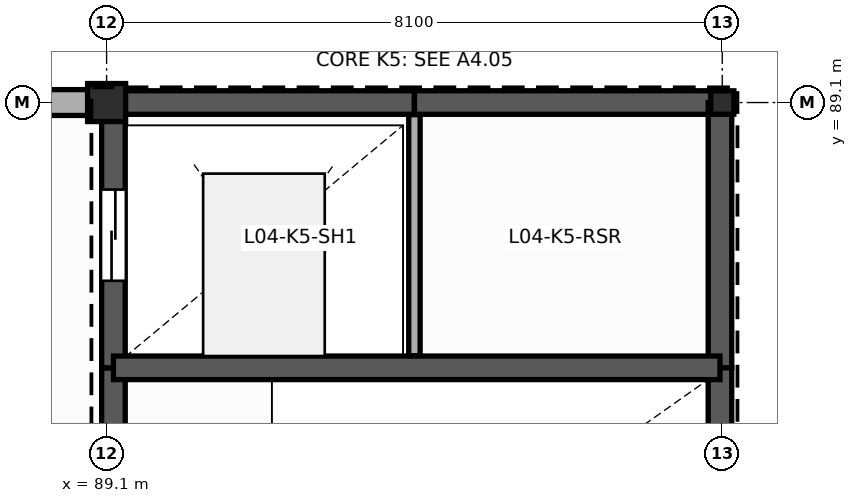
"""IFC4 building model, lengths in metres.
Left out: names, types, materials, properties, quantities, classifications, styles, units other than length and angle.
Written with IfcOpenShell. Run it as: python <this file> out.ifc"""

import sys

from ifc_helpers import new_model, si_unit, direction, frame, frame_2d, origin, origin_2d, place, context, subcontext, project, spatial, rectangle, i_section, extrude, element, fill, save


model = new_model("IFC4")
c1 = context("Model", 3, precision=1e-05, world=origin(), true_north=direction((0.0, 1.0)))
c2 = subcontext(c1, "Body", "Model", "MODEL_VIEW")
j1 = project(units=[si_unit("LENGTHUNIT", "METRE"), si_unit("PLANEANGLEUNIT", "RADIAN")], contexts=[c1])
p1 = place(None, origin())
s1 = spatial("IfcSite", under=j1, at=p1, CompositionType="ELEMENT")
p2 = place(p1, origin())
s2 = spatial("IfcBuilding", under=s1, at=p2, CompositionType="ELEMENT")
p3 = place(p2, frame((0.0, 0.0, 19.2)))
s3 = spatial("IfcBuildingStorey", under=s2, at=p3, CompositionType="ELEMENT", Elevation=19.2)
p4 = place(p3, frame((89.1, 89.1, 0.0), z_axis=(0.0, 0.0, 1.0), x_axis=(1.0, 0.0, 0.0)))
e1 = element("IfcColumn", 1, at=p4, inside=s3, PredefinedType="COLUMN", context=c2, shape_type="SweptSolid", body=[
    extrude(rectangle(XDim=0.5, YDim=0.5, at=origin_2d()), origin(), (0.0, 0.0, 1.0), 4.2),
])
p5 = place(p3, frame((97.2, 89.1, 0.0), z_axis=(0.0, 0.0, 1.0), x_axis=(1.0, 0.0, 0.0)))
e2 = element("IfcColumn", 2, at=p5, inside=s3, PredefinedType="COLUMN", context=c2, shape_type="SweptSolid", body=[
    extrude(i_section(OverallWidth=0.305, OverallDepth=0.308, WebThickness=0.01, FlangeThickness=0.015, FilletRadius=0.015, at=origin_2d()), origin(), (0.0, 0.0, 1.0), 4.2),
])
p6 = place(p3, frame((88.85, 89.1, 0.0), z_axis=(0.0, 0.0, 1.0), x_axis=(-1.0, 0.0, 0.0)))
e3 = element("IfcWall", 3, at=p6, inside=s3, PredefinedType="SOLIDWALL", context=c2, shape_type="SweptSolid", body=[
    extrude(rectangle(XDim=7.6, YDim=0.34, at=frame_2d((3.8, 0.0))), origin(), (0.0, 0.0, 1.0), 3.537),
])
p7 = place(p3, frame((89.19, 81.25, 0.0), z_axis=(0.0, 0.0, 1.0), x_axis=(0.0, 1.0, 0.0)))
e4 = element("IfcWall", 4, at=p7, inside=s3, PredefinedType="SHEAR", context=c2, shape_type="SweptSolid", body=[
    extrude(rectangle(XDim=4.36, YDim=0.31, at=frame_2d((2.18, 0.0))), origin(), (0.0, 0.0, 1.0), 4.2),
])
p8 = place(p7, frame((1.35, 0.0, 0.0)))
e5 = element("IfcOpeningElement", 5, at=p8, cuts=e4, PredefinedType="OPENING", context=c2, shape_type="SweptSolid", body=[
    extrude(rectangle(XDim=1.2, YDim=2.25, at=frame_2d((0.6, 1.125))), frame((0.0, 0.165, 0.0), z_axis=(0.0, -1.0, 0.0), x_axis=(1.0, 0.0, 0.0)), (0.0, 0.0, 1.0), 0.33),
])
p9 = place(p3, frame((89.19, 85.61, 0.0), z_axis=(0.0, 0.0, 1.0), x_axis=(0.0, 1.0, 0.0)))
e6 = element("IfcWall", 6, at=p9, inside=s3, PredefinedType="SHEAR", context=c2, shape_type="SweptSolid", body=[
    extrude(rectangle(XDim=3.49, YDim=0.31, at=frame_2d((1.745, 0.0))), origin(), (0.0, 0.0, 1.0), 4.2),
])
p10 = place(p9, frame((1.145, 0.0, 0.0)))
e7 = element("IfcOpeningElement", 7, at=p10, cuts=e6, PredefinedType="OPENING", context=c2, shape_type="SweptSolid", body=[
    extrude(rectangle(XDim=1.2, YDim=2.2, at=frame_2d((0.6, 1.1))), frame((0.0, 0.165, 0.0), z_axis=(0.0, -1.0, 0.0), x_axis=(1.0, 0.0, 0.0)), (0.0, 0.0, 1.0), 0.33),
])
p11 = place(p3, frame((89.19, 89.1, 0.0), z_axis=(0.0, 0.0, 1.0), x_axis=(1.0, 0.0, 0.0)))
e8 = element("IfcWall", 8, at=p11, inside=s3, PredefinedType="SHEAR", context=c2, shape_type="SweptSolid", body=[
    extrude(rectangle(XDim=3.96, YDim=0.31, at=frame_2d((1.98, 0.0))), origin(), (0.0, 0.0, 1.0), 4.2),
])
p12 = place(p3, frame((93.15, 89.1, 0.0), z_axis=(0.0, 0.0, 1.0), x_axis=(1.0, 0.0, 0.0)))
e9 = element("IfcWall", 9, at=p12, inside=s3, PredefinedType="SHEAR", context=c2, shape_type="SweptSolid", body=[
    extrude(rectangle(XDim=4.02, YDim=0.31, at=frame_2d((2.01, 0.0))), origin(), (0.0, 0.0, 1.0), 4.2),
])
p13 = place(p3, frame((97.17, 89.1, 0.0), z_axis=(0.0, 0.0, 1.0), x_axis=(0.0, -1.0, 0.0)))
e10 = element("IfcWall", 10, at=p13, inside=s3, PredefinedType="SHEAR", context=c2, shape_type="SweptSolid", body=[
    extrude(rectangle(XDim=3.49, YDim=0.31, at=frame_2d((1.745, 0.0))), origin(), (0.0, 0.0, 1.0), 4.2),
])
p14 = place(p3, frame((97.17, 85.61, 0.0), z_axis=(0.0, 0.0, 1.0), x_axis=(0.0, -1.0, 0.0)))
e11 = element("IfcWall", 11, at=p14, inside=s3, PredefinedType="SHEAR", context=c2, shape_type="SweptSolid", body=[
    extrude(rectangle(XDim=4.36, YDim=0.31, at=frame_2d((2.18, 0.0))), origin(), (0.0, 0.0, 1.0), 4.2),
])
p15 = place(p3, frame((89.19, 85.61, 0.0), z_axis=(0.0, 0.0, 1.0), x_axis=(1.0, 0.0, 0.0)))
e12 = element("IfcWall", 12, at=p15, inside=s3, PredefinedType="SHEAR", context=c2, shape_type="SweptSolid", body=[
    extrude(rectangle(XDim=7.98, YDim=0.31, at=frame_2d((3.99, 0.0))), origin(), (0.0, 0.0, 1.0), 4.2),
])
p16 = place(p3, frame((93.15, 85.77, 0.0), z_axis=(0.0, 0.0, 1.0), x_axis=(0.0, 1.0, 0.0)))
e13 = element("IfcWall", 13, at=p16, inside=s3, PredefinedType="PLUMBINGWALL", context=c2, shape_type="SweptSolid", body=[
    extrude(rectangle(XDim=3.17, YDim=0.15, at=frame_2d((1.585, 0.0))), origin(), (0.0, 0.0, 1.0), 3.85),
])
p17 = place(p10, origin())
e14 = element("IfcDoor", 14, at=p17, inside=s3, OperationType="SLIDING_TO_LEFT", PredefinedType="DOOR", context=c2, shape_type="SweptSolid", body=[
    extrude(rectangle(XDim=1.2, YDim=2.2, at=frame_2d((0.6, 1.1))), frame((0.0, 0.025, 0.0), z_axis=(0.0, -1.0, 0.0), x_axis=(1.0, 0.0, 0.0)), (0.0, 0.0, 1.0), 0.05),
])
fill(e7, e14)
save(model, sys.argv[1])
